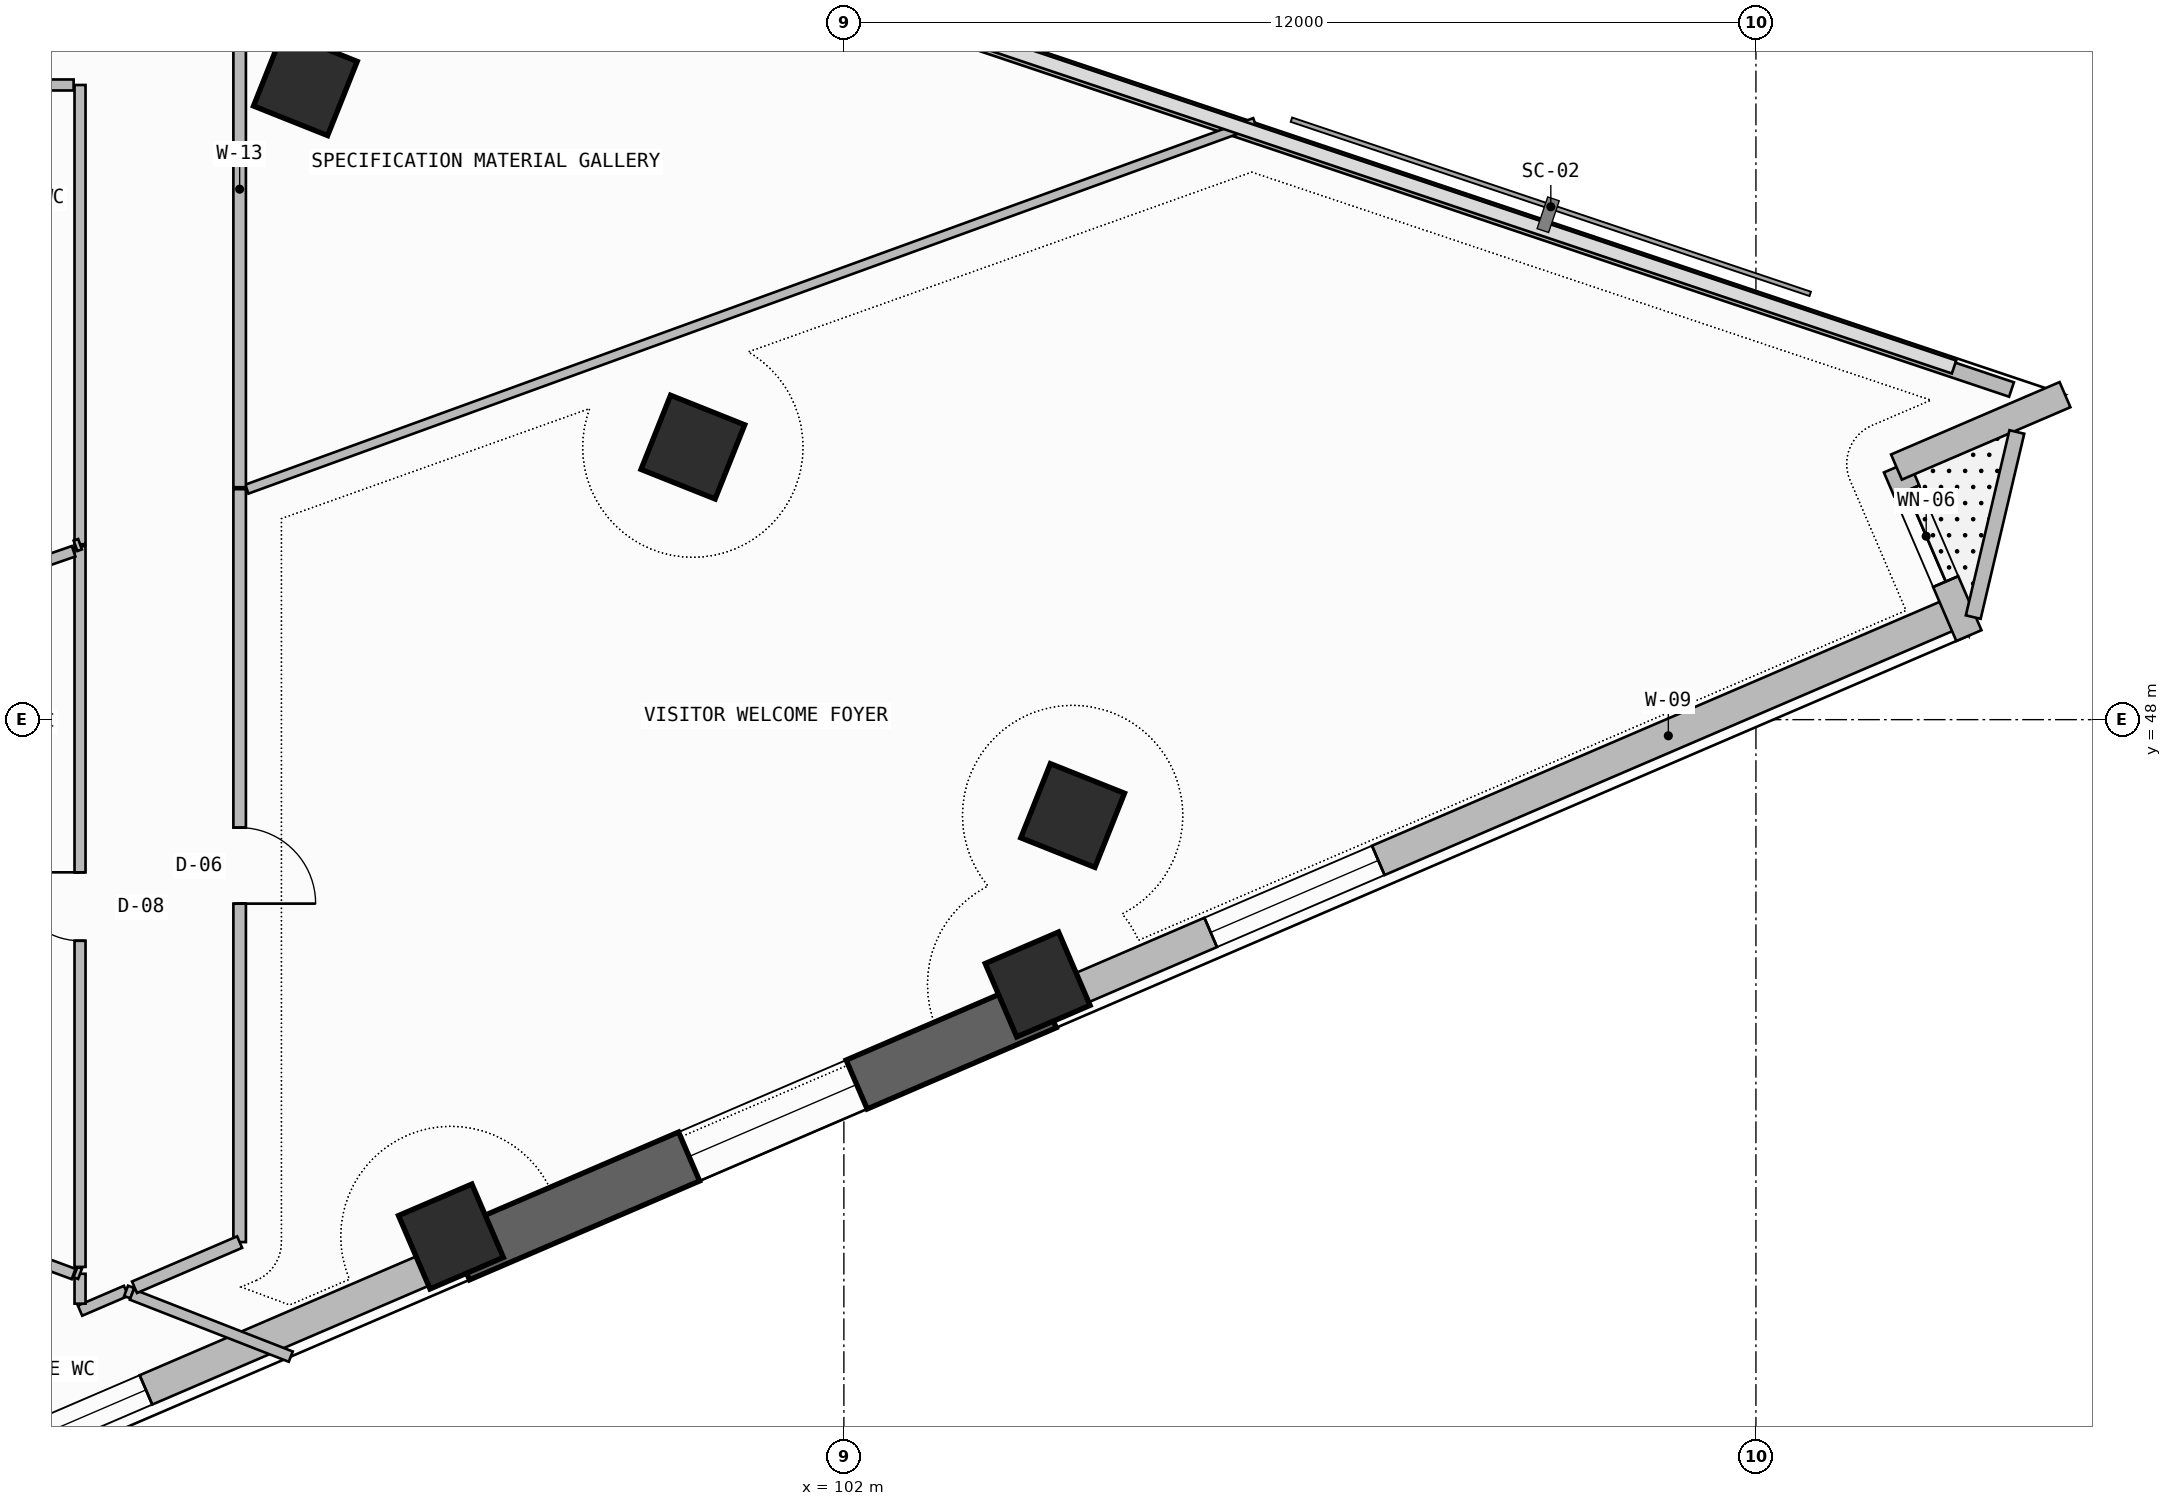
"""IFC4 building model, lengths in metres.
Left out: names, types, materials, properties, quantities, classifications, styles, units other than length and angle.
Written with IfcOpenShell. Run it as: python <this file> out.ifc"""

import sys

from ifc_helpers import new_model, si_unit, direction, frame, frame_2d, origin, origin_2d, place, context, subcontext, project, spatial, rectangle, extrude, element, fill, save


model = new_model("IFC4")
c1 = context("Model", 3, precision=1e-05, world=origin(), true_north=direction((0.0, 1.0)))
c2 = subcontext(c1, "Body", "Model", "MODEL_VIEW")
j1 = project(units=[si_unit("LENGTHUNIT", "METRE"), si_unit("PLANEANGLEUNIT", "RADIAN")], contexts=[c1])
p1 = place(None, origin())
s1 = spatial("IfcSite", under=j1, at=p1, CompositionType="ELEMENT")
p2 = place(p1, origin())
s2 = spatial("IfcBuilding", under=s1, at=p2, CompositionType="ELEMENT")
p3 = place(p2, frame((0.0, 0.0, 182.62)))
s3 = spatial("IfcBuildingStorey", under=s2, at=p3, CompositionType="ELEMENT", Elevation=182.62)
for number, where, z_axis, x_axis in (
    (1, (96.83, 41.2, 0.0), (0.0, 0.0, 1.0), (0.919, 0.395, 0.0)),
    (2, (104.549, 44.517, 0.0), (0.0, 0.0, 1.0), (0.919, 0.395, 0.0)),
    (3, (105.01, 46.739, 0.0), (0.0, 0.0, 1.0), (0.371, 0.929, 0.0)),
    (4, (100.013, 51.585, 0.0), (0.0, 0.0, 1.0), (0.371, 0.929, 0.0)),
    (5, (94.915, 56.367, 0.0), (0.0, 0.0, 1.0), (0.371, 0.929, 0.0)),
):
    element("IfcColumn", number, at=place(p3, frame(where, z_axis=z_axis, x_axis=x_axis)), inside=s3, PredefinedType="COLUMN", context=c2, shape_type="SweptSolid", body=[
        extrude(rectangle(XDim=1.05, YDim=1.05, at=origin_2d()), origin(), (0.0, 0.0, 1.0), 3.52),
    ])
p4 = place(p3, frame((86.1, 36.296, 0.0), z_axis=(0.0, 0.0, 1.0), x_axis=(0.918792412723, 0.394741057306, 0.0)))
e6 = element("IfcWall", 6, at=p4, inside=s3, PredefinedType="SOLIDWALL", context=c2, shape_type="SweptSolid", body=[
    extrude(rectangle(XDim=11.794, YDim=0.42, at=frame_2d((5.897, 0.0))), origin(), (0.0, 0.0, 1.0), 2.245),
])
p5 = place(p4, frame((4.911, 0.0, 1.2)))
e7 = element("IfcOpeningElement", 7, at=p5, cuts=e6, PredefinedType="OPENING", context=c2, shape_type="SweptSolid", body=[
    extrude(rectangle(XDim=2.4, YDim=0.9, at=frame_2d((1.2, 0.45))), frame((0.0, 0.22, 0.0), z_axis=(0.0, -1.0, 0.0), x_axis=(1.0, 0.0, 0.0)), (0.0, 0.0, 1.0), 0.44),
])
p6 = place(p3, frame((96.937, 40.952, -0.26), z_axis=(0.0, 0.0, 1.0), x_axis=(0.918782407933, 0.394764343468, 0.0)))
e8 = element("IfcWall", 8, at=p6, inside=s3, PredefinedType="SHEAR", context=c2, shape_type="SweptSolid", body=[
    extrude(rectangle(XDim=8.402, YDim=0.7, at=frame_2d((4.201, 0.0))), origin(), (0.0, 0.0, 1.0), 3.52),
])
p7 = place(p6, frame((3.294, 0.0, 1.2)))
e9 = element("IfcOpeningElement", 9, at=p7, cuts=e8, PredefinedType="OPENING", context=c2, shape_type="SweptSolid", body=[
    extrude(rectangle(XDim=2.4, YDim=0.9, at=frame_2d((1.2, 0.45))), frame((0.0, 0.36, 0.0), z_axis=(0.0, -1.0, 0.0), x_axis=(1.0, 0.0, 0.0)), (0.0, 0.0, 1.0), 0.72),
])
p8 = place(p3, frame((104.656, 44.269, 0.0), z_axis=(0.0, 0.0, 1.0), x_axis=(0.918789071809, 0.394748833467, 0.0)))
e10 = element("IfcWall", 10, at=p8, inside=s3, PredefinedType="SOLIDWALL", context=c2, shape_type="SweptSolid", body=[
    extrude(rectangle(XDim=13.069, YDim=0.42, at=frame_2d((6.534, 0.0))), origin(), (0.0, 0.0, 1.0), 2.245),
])
p9 = place(p8, frame((2.362, 0.0, 1.2)))
e11 = element("IfcOpeningElement", 11, at=p9, cuts=e10, PredefinedType="OPENING", context=c2, shape_type="SweptSolid", body=[
    extrude(rectangle(XDim=2.4, YDim=0.9, at=frame_2d((1.2, 0.45))), frame((0.0, 0.22, 0.0), z_axis=(0.0, -1.0, 0.0), x_axis=(1.0, 0.0, 0.0)), (0.0, 0.0, 1.0), 0.44),
])
p10 = place(p3, frame((116.802, 49.106, 0.0), z_axis=(0.0, 0.0, 1.0), x_axis=(-0.394712707157, 0.918804592288, 0.0)))
e12 = element("IfcWall", 12, at=p10, inside=s3, PredefinedType="SOLIDWALL", context=c2, shape_type="SweptSolid", body=[
    extrude(rectangle(XDim=2.414, YDim=0.36, at=frame_2d((1.207, 0.0))), origin(), (0.0, 0.0, 1.0), 3.26),
])
p11 = place(p10, frame((0.773, 0.0, 0.45)))
e13 = element("IfcOpeningElement", 13, at=p11, cuts=e12, PredefinedType="OPENING", context=c2, shape_type="SweptSolid", body=[
    extrude(rectangle(XDim=1.3, YDim=2.4, at=frame_2d((0.65, 1.2))), frame((0.0, 0.19, 0.0), z_axis=(0.0, -1.0, 0.0), x_axis=(1.0, 0.0, 0.0)), (0.0, 0.0, 1.0), 0.38),
])
p12 = place(p3, frame((115.849, 51.323, 0.0), z_axis=(0.0, 0.0, 1.0), x_axis=(0.918788830096, 0.394749396062, 0.0)))
e14 = element("IfcWall", 14, at=p12, inside=s3, PredefinedType="SOLIDWALL", context=c2, shape_type="SweptSolid", body=[
    extrude(rectangle(XDim=2.413, YDim=0.36, at=frame_2d((1.207, 0.0))), origin(), (0.0, 0.0, 1.0), 3.26),
])
p13 = place(p3, frame((116.859, 49.349, 0.0), z_axis=(0.0, 0.0, 1.0), x_axis=(0.229175279812, 0.973385171, 0.0)))
e15 = element("IfcWall", 15, at=p13, inside=s3, PredefinedType="PARAPET", context=c2, shape_type="SweptSolid", body=[
    extrude(rectangle(XDim=2.502, YDim=0.2, at=frame_2d((1.251, 0.0))), origin(), (0.0, 0.0, 1.0), 1.15),
])
p14 = place(p3, frame((117.363, 52.344, 0.0), z_axis=(0.0, 0.0, 1.0), x_axis=(-0.94800468727, 0.31825636351, 0.0)))
e16 = element("IfcWall", 16, at=p14, inside=s3, PredefinedType="PARAPET", context=c2, shape_type="SweptSolid", body=[
    extrude(rectangle(XDim=31.869, YDim=0.2, at=frame_2d((15.935, 0.0))), origin(), (0.0, 0.0, 1.0), 1.15),
])
p15 = place(p3, frame((91.95, 40.225, 0.0), z_axis=(0.0, 0.0, 1.0), x_axis=(0.918761815861, 0.394812266421, 0.0)))
e17 = element("IfcWall", 17, at=p15, inside=s3, PredefinedType="PARTITIONING", context=c2, shape_type="SweptSolid", body=[
    extrude(rectangle(XDim=0.66, YDim=0.145, at=frame_2d((0.33, 0.0))), origin(), (0.0, 0.0, 1.0), 3.26),
])
p16 = place(p3, frame((91.95, 40.71, 0.0), z_axis=(0.0, 0.0, 1.0), x_axis=(0.0, -1.0, 0.0)))
e18 = element("IfcWall", 18, at=p16, inside=s3, PredefinedType="PARTITIONING", context=c2, shape_type="SweptSolid", body=[
    extrude(rectangle(XDim=0.393, YDim=0.145, at=frame_2d((0.197, 0.0))), origin(), (0.0, 0.0, 1.0), 3.26),
])
p17 = place(p3, frame((92.556, 40.485, 0.0), z_axis=(0.0, 0.0, 1.0), x_axis=(0.936559447389, -0.35050877522, 0.0)))
e19 = element("IfcWall", 19, at=p17, inside=s3, PredefinedType="PARTITIONING", context=c2, shape_type="SweptSolid", body=[
    extrude(rectangle(XDim=0.087, YDim=0.145, at=frame_2d((0.043, 0.0))), origin(), (0.0, 0.0, 1.0), 3.26),
])
p18 = place(p3, frame((91.89, 40.732, 0.0), z_axis=(0.0, 0.0, 1.0), x_axis=(0.9366417498, -0.350288784478, 0.0)))
e20 = element("IfcWall", 20, at=p18, inside=s3, PredefinedType="PARTITIONING", context=c2, shape_type="SweptSolid", body=[
    extrude(rectangle(XDim=0.064, YDim=0.145, at=frame_2d((0.032, 0.0))), origin(), (0.0, 0.0, 1.0), 3.26),
])
p19 = place(p3, frame((88.485, 41.957, 0.0), z_axis=(0.0, 0.0, 1.0), x_axis=(0.937944697407, -0.346784867903, 0.0)))
e21 = element("IfcWall", 21, at=p19, inside=s3, PredefinedType="PARTITIONING", context=c2, shape_type="SweptSolid", body=[
    extrude(rectangle(XDim=3.604, YDim=0.145, at=frame_2d((1.802, 0.0))), origin(), (0.0, 0.0, 1.0), 3.26),
])
p20 = place(p3, frame((92.631, 40.437, 0.0), z_axis=(0.0, 0.0, 1.0), x_axis=(0.931460804404, -0.363841682411, 0.0)))
e22 = element("IfcWall", 22, at=p20, inside=s3, PredefinedType="PARTITIONING", context=c2, shape_type="SweptSolid", body=[
    extrude(rectangle(XDim=2.245, YDim=0.145, at=frame_2d((1.123, 0.0))), origin(), (0.0, 0.0, 1.0), 3.26),
])
p21 = place(p3, frame((91.95, 50.283, 0.0), z_axis=(0.0, 0.0, 1.0), x_axis=(0.0, -1.0, 0.0)))
e23 = element("IfcWall", 23, at=p21, inside=s3, PredefinedType="PARTITIONING", context=c2, shape_type="SweptSolid", body=[
    extrude(rectangle(XDim=9.483, YDim=0.145, at=frame_2d((4.741, 0.0))), origin(), (0.0, 0.0, 1.0), 2.745),
])
p22 = place(p21, frame((4.292, 0.0, 0.0)))
e24 = element("IfcOpeningElement", 24, at=p22, cuts=e23, PredefinedType="OPENING", context=c2, shape_type="SweptSolid", body=[
    extrude(rectangle(XDim=0.9, YDim=2.1, at=frame_2d((0.45, 1.05))), frame((0.0, 0.083, 0.0), z_axis=(0.0, -1.0, 0.0), x_axis=(1.0, 0.0, 0.0)), (0.0, 0.0, 1.0), 0.165),
])
p23 = place(p3, frame((88.46, 49.036, 0.0), z_axis=(0.0, 0.0, 1.0), x_axis=(0.944947404907, 0.327222251627, 0.0)))
e25 = element("IfcWall", 25, at=p23, inside=s3, PredefinedType="PARTITIONING", context=c2, shape_type="SweptSolid", body=[
    extrude(rectangle(XDim=3.604, YDim=0.145, at=frame_2d((1.802, 0.0))), origin(), (0.0, 0.0, 1.0), 3.26),
])
p24 = place(p3, frame((94.05, 41.127, 0.0), z_axis=(0.0, 0.0, 1.0), x_axis=(0.0, 1.0, 0.0)))
e26 = element("IfcWall", 26, at=p24, inside=s3, PredefinedType="PARTITIONING", context=c2, shape_type="SweptSolid", body=[
    extrude(rectangle(XDim=9.906, YDim=0.165, at=frame_2d((4.953, 0.0))), origin(), (0.0, 0.0, 1.0), 2.745),
])
p25 = place(p24, frame((4.453, 0.0, 0.0)))
e27 = element("IfcOpeningElement", 27, at=p25, cuts=e26, PredefinedType="OPENING", context=c2, shape_type="SweptSolid", body=[
    extrude(rectangle(XDim=1.0, YDim=2.2, at=frame_2d((0.5, 1.1))), frame((0.0, 0.093, 0.0), z_axis=(0.0, -1.0, 0.0), x_axis=(1.0, 0.0, 0.0)), (0.0, 0.0, 1.0), 0.185),
])
p26 = place(p3, frame((92.667, 40.532, 0.0), z_axis=(0.0, 0.0, 1.0), x_axis=(0.918809189305, 0.394702006136, 0.0)))
e28 = element("IfcWall", 28, at=p26, inside=s3, PredefinedType="PARTITIONING", context=c2, shape_type="SweptSolid", body=[
    extrude(rectangle(XDim=1.506, YDim=0.165, at=frame_2d((0.753, 0.0))), origin(), (0.0, 0.0, 1.0), 3.26),
])
p27 = place(p3, frame((94.145, 51.032, 0.0), z_axis=(0.0, 0.0, 1.0), x_axis=(0.939805041103, 0.341711112955, 0.0)))
e29 = element("IfcWall", 29, at=p27, inside=s3, PredefinedType="PARTITIONING", context=c2, shape_type="SweptSolid", body=[
    extrude(rectangle(XDim=14.111, YDim=0.125, at=frame_2d((7.056, 0.0))), origin(), (0.0, 0.0, 1.0), 2.645),
])
p28 = place(p3, frame((94.05, 51.058, 0.0), z_axis=(0.0, 0.0, 1.0), x_axis=(0.0, 1.0, 0.0)))
e30 = element("IfcWall", 30, at=p28, inside=s3, PredefinedType="PARTITIONING", context=c2, shape_type="SweptSolid", body=[
    extrude(rectangle(XDim=7.842, YDim=0.165, at=frame_2d((3.921, 0.0))), origin(), (0.0, 0.0, 1.0), 2.645),
])
p29 = place(p3, frame((91.95, 56.35, 0.0), z_axis=(0.0, 0.0, 1.0), x_axis=(0.0, -1.0, 0.0)))
e31 = element("IfcWall", 31, at=p29, inside=s3, PredefinedType="PARTITIONING", context=c2, shape_type="SweptSolid", body=[
    extrude(rectangle(XDim=6.042, YDim=0.145, at=frame_2d((3.021, 0.0))), origin(), (0.0, 0.0, 1.0), 2.745),
])
p30 = place(p3, frame((88.485, 56.35, 0.0), z_axis=(0.0, 0.0, 1.0), x_axis=(1.0, 0.0, 0.0)))
e32 = element("IfcWall", 32, at=p30, inside=s3, PredefinedType="PARTITIONING", context=c2, shape_type="SweptSolid", body=[
    extrude(rectangle(XDim=3.381, YDim=0.145, at=frame_2d((1.69, 0.0))), origin(), (0.0, 0.0, 1.0), 2.745),
])
p31 = place(p3, frame((91.95, 50.308, 0.0), z_axis=(0.0, 0.0, 1.0), x_axis=(-0.942777884126, -0.333421446825, 0.0)))
e33 = element("IfcWall", 33, at=p31, inside=s3, PredefinedType="PARTITIONING", context=c2, shape_type="SweptSolid", body=[
    extrude(rectangle(XDim=0.064, YDim=0.145, at=frame_2d((0.032, 0.0))), origin(), (0.0, 0.0, 1.0), 3.26),
])
p32 = place(p5, origin())
e34 = element("IfcWindow", 34, at=p32, inside=s3, PartitioningType="SINGLE_PANEL", PredefinedType="WINDOW", context=c2, shape_type="SweptSolid", body=[
    extrude(rectangle(XDim=2.4, YDim=0.9, at=frame_2d((1.2, 0.45))), frame((0.0, 0.03, 0.0), z_axis=(0.0, -1.0, 0.0), x_axis=(1.0, 0.0, 0.0)), (0.0, 0.0, 1.0), 0.06),
])
fill(e7, e34)
p33 = place(p7, origin())
e35 = element("IfcWindow", 35, at=p33, inside=s3, PartitioningType="SINGLE_PANEL", PredefinedType="WINDOW", context=c2, shape_type="SweptSolid", body=[
    extrude(rectangle(XDim=2.4, YDim=0.9, at=frame_2d((1.2, 0.45))), frame((0.0, 0.03, 0.0), z_axis=(0.0, -1.0, 0.0), x_axis=(1.0, 0.0, 0.0)), (0.0, 0.0, 1.0), 0.06),
])
fill(e9, e35)
p34 = place(p9, origin())
e36 = element("IfcWindow", 36, at=p34, inside=s3, PartitioningType="SINGLE_PANEL", PredefinedType="WINDOW", context=c2, shape_type="SweptSolid", body=[
    extrude(rectangle(XDim=2.4, YDim=0.9, at=frame_2d((1.2, 0.45))), frame((0.0, 0.03, 0.0), z_axis=(0.0, -1.0, 0.0), x_axis=(1.0, 0.0, 0.0)), (0.0, 0.0, 1.0), 0.06),
])
fill(e11, e36)
p35 = place(p11, origin())
e37 = element("IfcWindow", 37, at=p35, inside=s3, PartitioningType="SINGLE_PANEL", PredefinedType="WINDOW", context=c2, shape_type="SweptSolid", body=[
    extrude(rectangle(XDim=1.3, YDim=2.4, at=frame_2d((0.65, 1.2))), frame((0.0, 0.03, 0.0), z_axis=(0.0, -1.0, 0.0), x_axis=(1.0, 0.0, 0.0)), (0.0, 0.0, 1.0), 0.06),
])
fill(e13, e37)
p36 = place(p22, frame((0.9, 0.0, 0.0), z_axis=(0.0, 0.0, 1.0), x_axis=(-1.0, 0.0, 0.0)))
e38 = element("IfcDoor", 38, at=p36, inside=s3, OperationType="SINGLE_SWING_RIGHT", PredefinedType="DOOR", context=c2, shape_type="SweptSolid", body=[
    extrude(rectangle(XDim=0.9, YDim=2.1, at=frame_2d((0.45, 1.05))), frame((0.0, 0.025, 0.0), z_axis=(0.0, -1.0, 0.0), x_axis=(1.0, 0.0, 0.0)), (0.0, 0.0, 1.0), 0.05),
])
fill(e24, e38)
p37 = place(p25, frame((1.0, 0.0, 0.0), z_axis=(0.0, 0.0, 1.0), x_axis=(-1.0, 0.0, 0.0)))
e39 = element("IfcDoor", 39, at=p37, inside=s3, OperationType="SINGLE_SWING_RIGHT", PredefinedType="DOOR", context=c2, shape_type="SweptSolid", body=[
    extrude(rectangle(XDim=1.0, YDim=2.2, at=frame_2d((0.5, 1.1))), frame((0.0, 0.025, 0.0), z_axis=(0.0, -1.0, 0.0), x_axis=(1.0, 0.0, 0.0)), (0.0, 0.0, 1.0), 0.05),
])
fill(e27, e39)
save(model, sys.argv[1])
